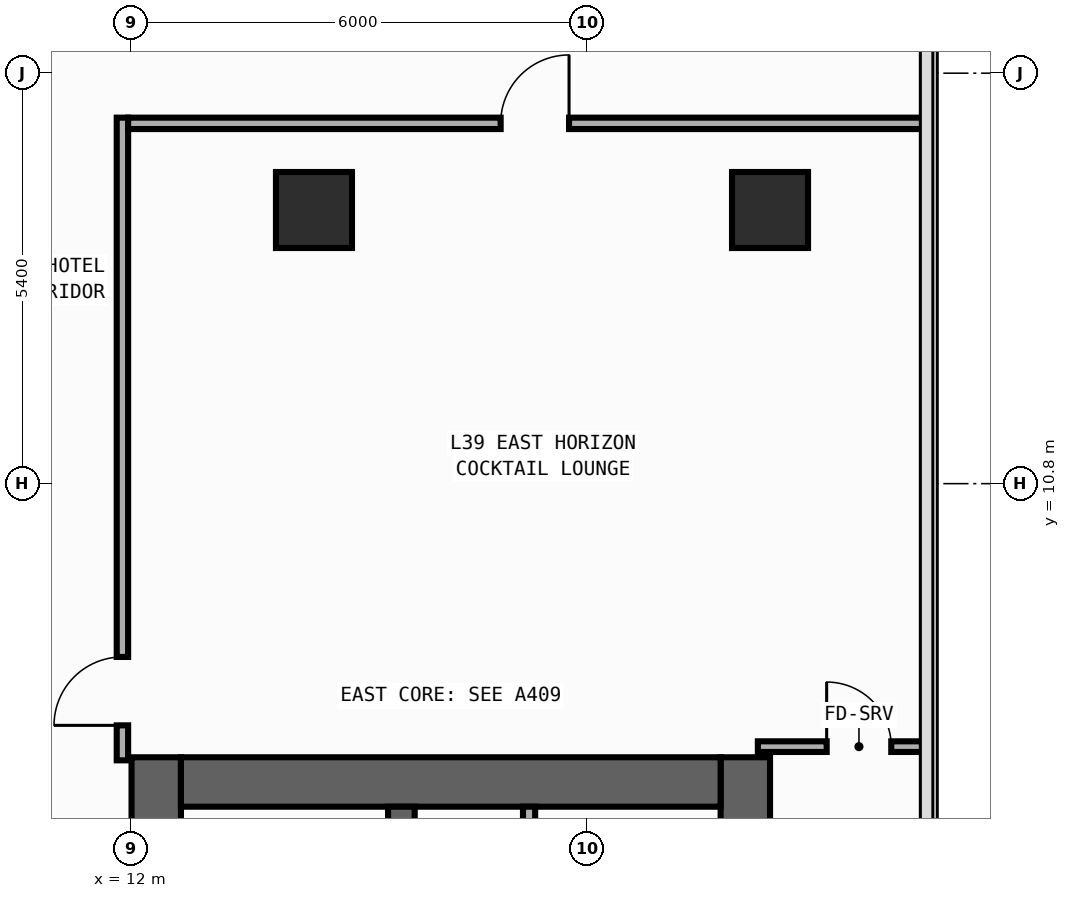
"""IFC4 building model, lengths in metres.
Left out: names, types, materials, properties, quantities, classifications, styles, units other than length and angle.
Written with IfcOpenShell. Run it as: python <this file> out.ifc"""

import sys

from ifc_helpers import new_model, si_unit, direction, frame, frame_2d, origin, origin_2d, place, context, subcontext, project, spatial, rectangle, extrude, element, fill, save


model = new_model("IFC4")
c1 = context("Model", 3, precision=1e-05, world=origin(), true_north=direction((0.0, 1.0)))
c2 = subcontext(c1, "Body", "Model", "MODEL_VIEW")
j1 = project(units=[si_unit("LENGTHUNIT", "METRE"), si_unit("PLANEANGLEUNIT", "RADIAN")], contexts=[c1])
p1 = place(None, origin())
s1 = spatial("IfcSite", under=j1, at=p1, CompositionType="ELEMENT")
p2 = place(p1, origin())
s2 = spatial("IfcBuilding", under=s1, at=p2, CompositionType="ELEMENT")
p3 = place(p2, frame((0.0, 0.0, 172.6)))
s3 = spatial("IfcBuildingStorey", under=s2, at=p3, CompositionType="ELEMENT", Elevation=172.6)
p4 = place(p3, frame((12.325, -19.8, 0.0), z_axis=(0.0, 0.0, 1.0), x_axis=(0.0, 1.0, 0.0)))
e1 = element("IfcWall", 1, at=p4, inside=s3, PredefinedType="SHEAR", context=c2, shape_type="SweptSolid", body=[
    extrude(rectangle(XDim=27.0, YDim=0.65, at=frame_2d((13.5, 0.0))), origin(), (0.0, 0.0, 1.0), 3.54),
])
p5 = place(p4, frame((23.05, 0.0, 0.0)))
e2 = element("IfcOpeningElement", 2, at=p5, cuts=e1, PredefinedType="OPENING", context=c2, shape_type="SweptSolid", body=[
    extrude(rectangle(XDim=1.1, YDim=2.2, at=frame_2d((0.55, 1.1))), frame((0.0, 0.335, 0.0), z_axis=(0.0, -1.0, 0.0), x_axis=(1.0, 0.0, 0.0)), (0.0, 0.0, 1.0), 0.67),
])
p6 = place(p4, frame((19.85, 0.0, 0.0)))
e3 = element("IfcOpeningElement", 3, at=p6, cuts=e1, PredefinedType="OPENING", context=c2, shape_type="SweptSolid", body=[
    extrude(rectangle(XDim=1.1, YDim=2.2, at=frame_2d((0.55, 1.1))), frame((0.0, 0.335, 0.0), z_axis=(0.0, -1.0, 0.0), x_axis=(1.0, 0.0, 0.0)), (0.0, 0.0, 1.0), 0.67),
])
p7 = place(p4, frame((16.65, 0.0, 0.0)))
e4 = element("IfcOpeningElement", 4, at=p7, cuts=e1, PredefinedType="OPENING", context=c2, shape_type="SweptSolid", body=[
    extrude(rectangle(XDim=1.1, YDim=2.2, at=frame_2d((0.55, 1.1))), frame((0.0, 0.335, 0.0), z_axis=(0.0, -1.0, 0.0), x_axis=(1.0, 0.0, 0.0)), (0.0, 0.0, 1.0), 0.67),
])
p8 = place(p4, frame((10.175, 0.0, 0.0)))
e5 = element("IfcOpeningElement", 5, at=p8, cuts=e1, PredefinedType="OPENING", context=c2, shape_type="SweptSolid", body=[
    extrude(rectangle(XDim=0.85, YDim=2.1, at=frame_2d((0.425, 1.05))), frame((0.0, 0.335, 0.0), z_axis=(0.0, -1.0, 0.0), x_axis=(1.0, 0.0, 0.0)), (0.0, 0.0, 1.0), 0.67),
])
p9 = place(p4, frame((12.725, 0.0, 0.0)))
e6 = element("IfcOpeningElement", 6, at=p9, cuts=e1, PredefinedType="OPENING", context=c2, shape_type="SweptSolid", body=[
    extrude(rectangle(XDim=1.15, YDim=2.2, at=frame_2d((0.575, 1.1))), frame((0.0, 0.335, 0.0), z_axis=(0.0, -1.0, 0.0), x_axis=(1.0, 0.0, 0.0)), (0.0, 0.0, 1.0), 0.67),
])
p10 = place(p4, frame((25.125, 0.0, 0.0)))
e7 = element("IfcOpeningElement", 7, at=p10, cuts=e1, PredefinedType="OPENING", context=c2, shape_type="SweptSolid", body=[
    extrude(rectangle(XDim=0.85, YDim=2.1, at=frame_2d((0.425, 1.05))), frame((0.0, 0.335, 0.0), z_axis=(0.0, -1.0, 0.0), x_axis=(1.0, 0.0, 0.0)), (0.0, 0.0, 1.0), 0.67),
])
p11 = place(p3, frame((20.075, -19.8, 0.0), z_axis=(0.0, 0.0, 1.0), x_axis=(0.0, 1.0, 0.0)))
e8 = element("IfcWall", 8, at=p11, inside=s3, PredefinedType="SHEAR", context=c2, shape_type="SweptSolid", body=[
    extrude(rectangle(XDim=27.0, YDim=0.65, at=frame_2d((13.5, 0.0))), origin(), (0.0, 0.0, 1.0), 3.54),
])
p12 = place(p3, frame((12.65, 6.875, 0.0), z_axis=(0.0, 0.0, 1.0), x_axis=(1.0, 0.0, 0.0)))
e9 = element("IfcWall", 9, at=p12, inside=s3, PredefinedType="SHEAR", context=c2, shape_type="SweptSolid", body=[
    extrude(rectangle(XDim=7.1, YDim=0.65, at=frame_2d((3.55, 0.0))), origin(), (0.0, 0.0, 1.0), 3.54),
])
p13 = place(p3, frame((15.55, -19.15, 0.0), z_axis=(0.0, 0.0, 1.0), x_axis=(0.0, 1.0, 0.0)))
e10 = element("IfcWall", 10, at=p13, inside=s3, PredefinedType="SHEAR", context=c2, shape_type="SweptSolid", body=[
    extrude(rectangle(XDim=25.7, YDim=0.35, at=frame_2d((12.85, 0.0))), origin(), (0.0, 0.0, 1.0), 3.54),
])
p14 = place(p13, frame((12.075, 0.0, 0.0)))
e11 = element("IfcOpeningElement", 11, at=p14, cuts=e10, PredefinedType="OPENING", context=c2, shape_type="SweptSolid", body=[
    extrude(rectangle(XDim=1.15, YDim=2.2, at=frame_2d((0.575, 1.1))), frame((0.0, 0.185, 0.0), z_axis=(0.0, -1.0, 0.0), x_axis=(1.0, 0.0, 0.0)), (0.0, 0.0, 1.0), 0.37),
])
p15 = place(p13, frame((24.475, 0.0, 0.0)))
e12 = element("IfcOpeningElement", 12, at=p15, cuts=e10, PredefinedType="OPENING", context=c2, shape_type="SweptSolid", body=[
    extrude(rectangle(XDim=0.85, YDim=2.1, at=frame_2d((0.425, 1.05))), frame((0.0, 0.185, 0.0), z_axis=(0.0, -1.0, 0.0), x_axis=(1.0, 0.0, 0.0)), (0.0, 0.0, 1.0), 0.37),
])
for number, where, z_axis, x_axis in (
    (13, (20.4, 14.4, 0.0), (0.0, 0.0, 1.0), (1.0, 0.0, 0.0)),
    (14, (14.4, 14.4, 0.0), (0.0, 0.0, 1.0), (1.0, 0.0, 0.0)),
):
    element("IfcColumn", number, at=place(p3, frame(where, z_axis=z_axis, x_axis=x_axis)), inside=s3, PredefinedType="COLUMN", context=c2, shape_type="SweptSolid", body=[
        extrude(rectangle(XDim=1.0, YDim=1.0, at=origin_2d()), origin(), (0.0, 0.0, 1.0), 3.8),
    ])
p16 = place(p3, frame((17.23, 4.17, 0.0), z_axis=(0.0, 0.0, 1.0), x_axis=(0.0, 1.0, 0.0)))
e15 = element("IfcWall", 15, at=p16, inside=s3, PredefinedType="PARTITIONING", context=c2, shape_type="SweptSolid", body=[
    extrude(rectangle(XDim=2.38, YDim=0.16, at=frame_2d((1.19, 0.0))), origin(), (0.0, 0.0, 1.0), 3.54),
])
p17 = place(p16, frame((0.46, 0.0, 0.0)))
e16 = element("IfcOpeningElement", 16, at=p17, cuts=e15, PredefinedType="OPENING", context=c2, shape_type="SweptSolid", body=[
    extrude(rectangle(XDim=0.85, YDim=2.1, at=frame_2d((0.425, 1.05))), frame((0.0, 0.09, 0.0), z_axis=(0.0, -1.0, 0.0), x_axis=(1.0, 0.0, 0.0)), (0.0, 0.0, 1.0), 0.18),
])
p18 = place(p3, frame((11.88, 7.16, 0.0), z_axis=(0.0, 0.0, 1.0), x_axis=(0.0, 1.0, 0.0)))
e17 = element("IfcWall", 17, at=p18, inside=s3, PredefinedType="PARTITIONING", context=c2, shape_type="SweptSolid", body=[
    extrude(rectangle(XDim=8.455, YDim=0.15, at=frame_2d((4.228, 0.0))), origin(), (0.0, 0.0, 1.0), 3.54),
])
p19 = place(p18, frame((0.46, 0.0, 0.0)))
e18 = element("IfcOpeningElement", 18, at=p19, cuts=e17, PredefinedType="OPENING", context=c2, shape_type="SweptSolid", body=[
    extrude(rectangle(XDim=0.9, YDim=2.15, at=frame_2d((0.45, 1.075))), frame((0.0, 0.085, 0.0), z_axis=(0.0, -1.0, 0.0), x_axis=(1.0, 0.0, 0.0)), (0.0, 0.0, 1.0), 0.17),
])
p20 = place(p3, frame((11.955, 15.54, 0.0), z_axis=(0.0, 0.0, 1.0), x_axis=(1.0, 0.0, 0.0)))
e19 = element("IfcWall", 19, at=p20, inside=s3, PredefinedType="PARTITIONING", context=c2, shape_type="SweptSolid", body=[
    extrude(rectangle(XDim=10.5, YDim=0.15, at=frame_2d((5.25, 0.0))), origin(), (0.0, 0.0, 1.0), 3.54),
])
p21 = place(p20, frame((4.901, 0.0, 0.0)))
e20 = element("IfcOpeningElement", 20, at=p21, cuts=e19, PredefinedType="OPENING", context=c2, shape_type="SweptSolid", body=[
    extrude(rectangle(XDim=0.9, YDim=2.15, at=frame_2d((0.45, 1.075))), frame((0.0, 0.085, 0.0), z_axis=(0.0, -1.0, 0.0), x_axis=(1.0, 0.0, 0.0)), (0.0, 0.0, 1.0), 0.17),
])
p22 = place(p3, frame((20.24, 7.34, 0.0), z_axis=(0.0, 0.0, 1.0), x_axis=(1.0, 0.0, 0.0)))
e21 = element("IfcWall", 21, at=p22, inside=s3, PredefinedType="PARTITIONING", context=c2, shape_type="SweptSolid", body=[
    extrude(rectangle(XDim=2.215, YDim=0.14, at=frame_2d((1.107, 0.0))), origin(), (0.0, 0.0, 1.0), 3.54),
])
p23 = place(p22, frame((0.905, 0.0, 0.0)))
e22 = element("IfcOpeningElement", 22, at=p23, cuts=e21, PredefinedType="OPENING", context=c2, shape_type="SweptSolid", body=[
    extrude(rectangle(XDim=0.85, YDim=2.1, at=frame_2d((0.425, 1.05))), frame((0.0, 0.08, 0.0), z_axis=(0.0, -1.0, 0.0), x_axis=(1.0, 0.0, 0.0)), (0.0, 0.0, 1.0), 0.16),
])
p24 = place(p19, origin())
e23 = element("IfcDoor", 23, at=p24, inside=s3, OperationType="SINGLE_SWING_LEFT", PredefinedType="DOOR", context=c2, shape_type="SweptSolid", body=[
    extrude(rectangle(XDim=0.9, YDim=2.15, at=frame_2d((0.45, 1.075))), frame((0.0, 0.025, 0.0), z_axis=(0.0, -1.0, 0.0), x_axis=(1.0, 0.0, 0.0)), (0.0, 0.0, 1.0), 0.05),
])
fill(e18, e23)
p25 = place(p21, origin())
e24 = element("IfcDoor", 24, at=p25, inside=s3, OperationType="SINGLE_SWING_RIGHT", PredefinedType="DOOR", context=c2, shape_type="SweptSolid", body=[
    extrude(rectangle(XDim=0.9, YDim=2.15, at=frame_2d((0.45, 1.075))), frame((0.0, 0.025, 0.0), z_axis=(0.0, -1.0, 0.0), x_axis=(1.0, 0.0, 0.0)), (0.0, 0.0, 1.0), 0.05),
])
fill(e20, e24)
p26 = place(p23, origin())
e25 = element("IfcDoor", 25, at=p26, inside=s3, OperationType="SINGLE_SWING_LEFT", PredefinedType="DOOR", context=c2, shape_type="SweptSolid", body=[
    extrude(rectangle(XDim=0.85, YDim=2.1, at=frame_2d((0.425, 1.05))), frame((0.0, 0.025, 0.0), z_axis=(0.0, -1.0, 0.0), x_axis=(1.0, 0.0, 0.0)), (0.0, 0.0, 1.0), 0.05),
])
fill(e22, e25)
save(model, sys.argv[1])
